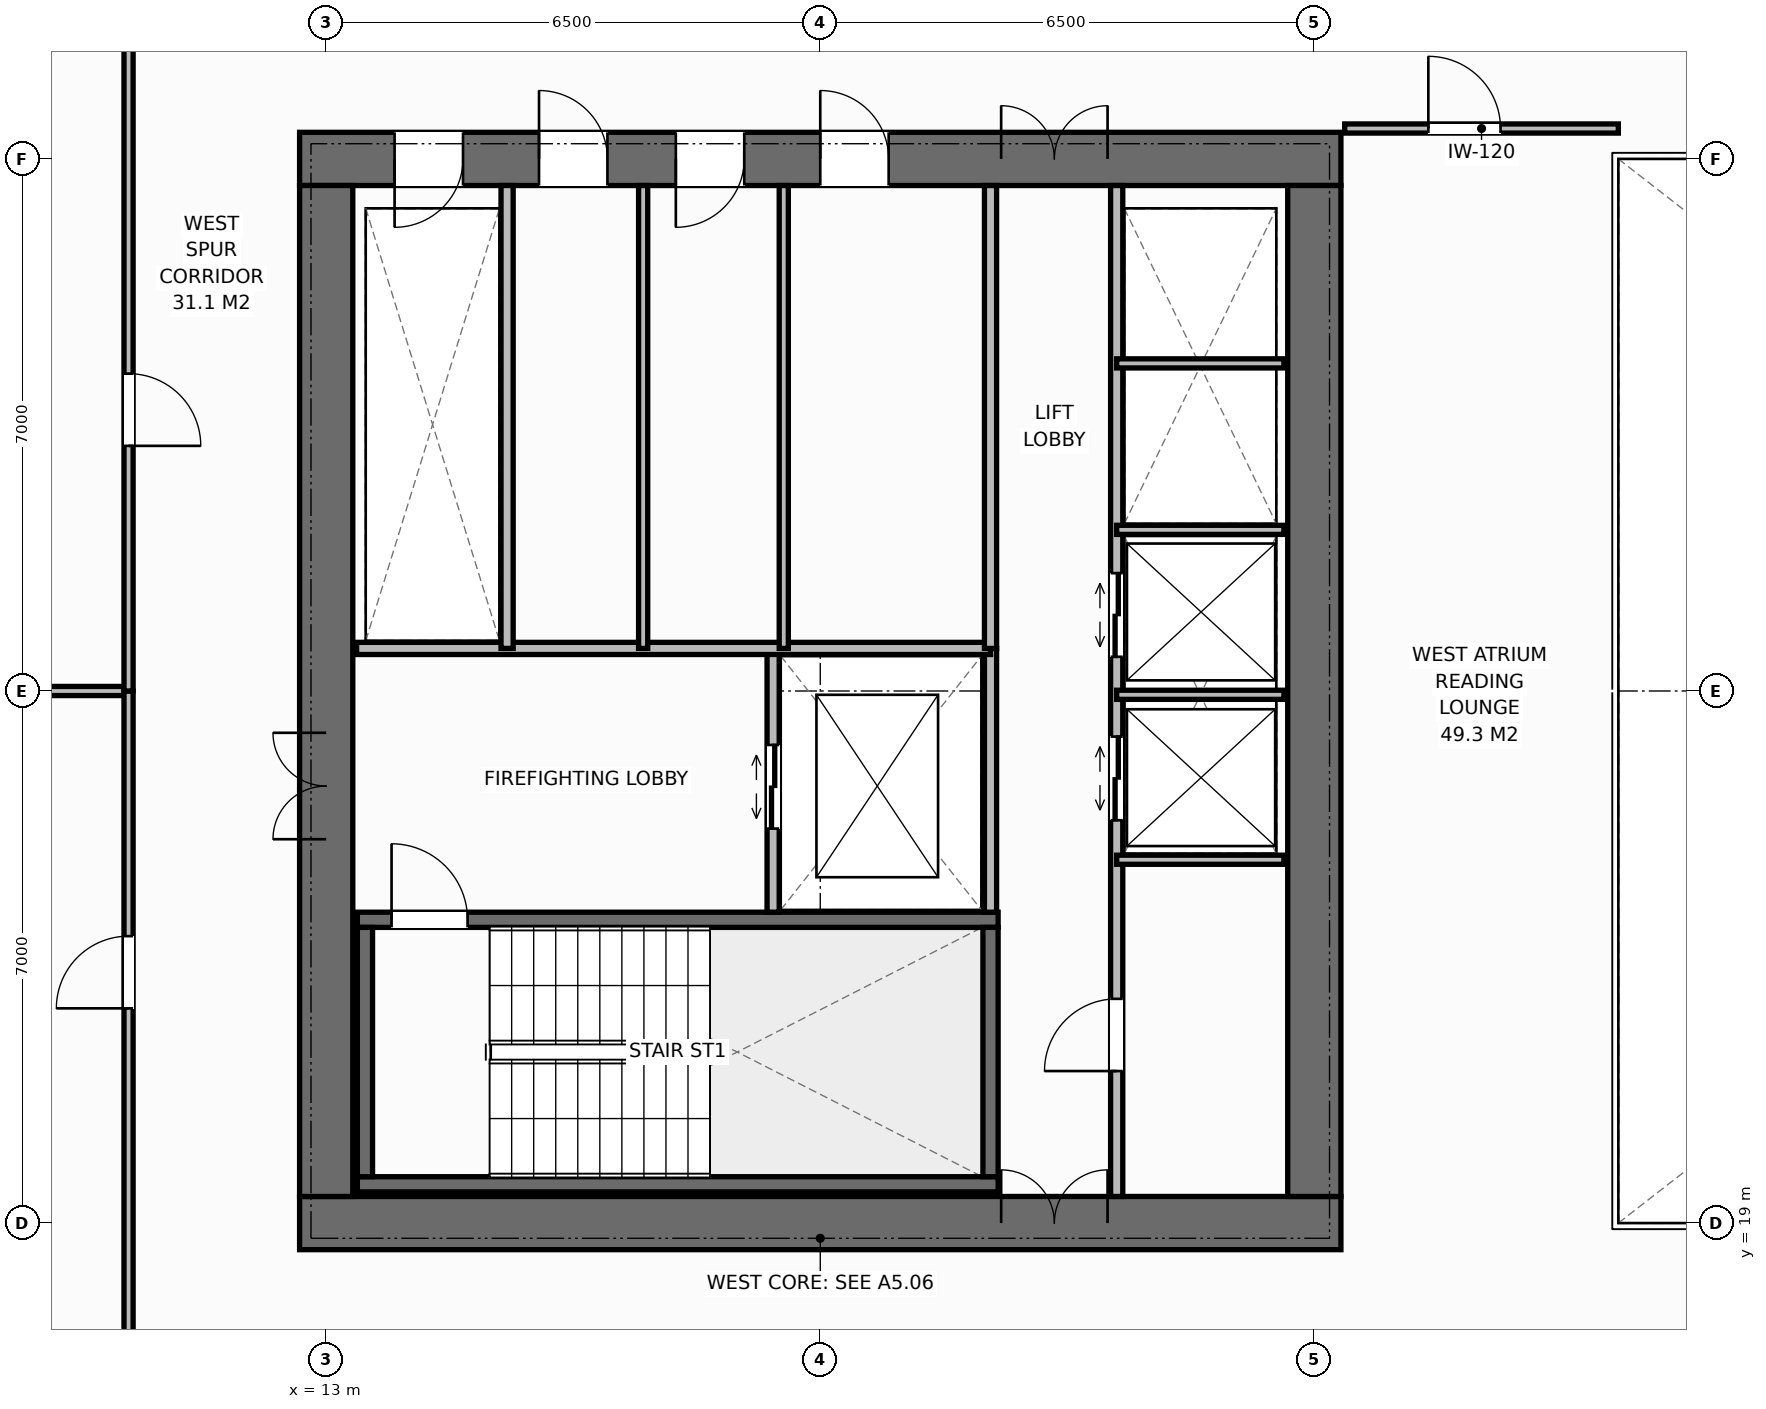
"""IFC4 building model, lengths in metres.
Left out: names, types, materials, properties, quantities, classifications, styles, units other than length and angle.
Written with IfcOpenShell. Run it as: python <this file> out.ifc"""

import sys

from ifc_helpers import new_model, si_unit, direction, frame, frame_2d, origin, place, context, subcontext, project, spatial, rectangle, extrude, element, fill, save


model = new_model("IFC4")
c1 = context("Model", 3, precision=1e-05, world=origin(), true_north=direction((0.0, 1.0)))
c2 = subcontext(c1, "Body", "Model", "MODEL_VIEW")
j1 = project(units=[si_unit("LENGTHUNIT", "METRE"), si_unit("PLANEANGLEUNIT", "RADIAN")], contexts=[c1])
p1 = place(None, origin())
s1 = spatial("IfcSite", under=j1, at=p1, CompositionType="ELEMENT")
p2 = place(p1, origin())
s2 = spatial("IfcBuilding", under=s1, at=p2, CompositionType="ELEMENT")
p3 = place(p2, frame((0.0, 0.0, 112.6)))
s3 = spatial("IfcBuildingStorey", under=s2, at=p3, CompositionType="ELEMENT", Elevation=112.6)
p4 = place(p3, frame((12.65, 19.0, 0.0), z_axis=(0.0, 0.0, 1.0), x_axis=(1.0, 0.0, 0.0)))
e1 = element("IfcWall", 1, at=p4, inside=s3, PredefinedType="SHEAR", context=c2, shape_type="SweptSolid", body=[
    extrude(rectangle(XDim=13.7, YDim=0.7, at=frame_2d((6.85, 0.0))), origin(), (0.0, 0.0, 1.0), 3.8),
])
p5 = place(p4, frame((9.23, 0.0, 0.0)))
e2 = element("IfcOpeningElement", 2, at=p5, cuts=e1, PredefinedType="OPENING", context=c2, shape_type="SweptSolid", body=[
    extrude(rectangle(XDim=1.4, YDim=2.2, at=frame_2d((0.7, 1.1))), frame((0.0, 0.36, 0.0), z_axis=(0.0, -1.0, 0.0), x_axis=(1.0, 0.0, 0.0)), (0.0, 0.0, 1.0), 0.72),
])
p6 = place(p3, frame((12.65, 33.0, 0.0), z_axis=(0.0, 0.0, 1.0), x_axis=(1.0, 0.0, 0.0)))
e3 = element("IfcWall", 3, at=p6, inside=s3, PredefinedType="SHEAR", context=c2, shape_type="SweptSolid", body=[
    extrude(rectangle(XDim=13.7, YDim=0.7, at=frame_2d((6.85, 0.0))), origin(), (0.0, 0.0, 1.0), 3.8),
])
p7 = place(p6, frame((1.25, 0.0, 0.0)))
e4 = element("IfcOpeningElement", 4, at=p7, cuts=e3, PredefinedType="OPENING", context=c2, shape_type="SweptSolid", body=[
    extrude(rectangle(XDim=0.9, YDim=2.15, at=frame_2d((0.45, 1.075))), frame((0.0, 0.36, 0.0), z_axis=(0.0, -1.0, 0.0), x_axis=(1.0, 0.0, 0.0)), (0.0, 0.0, 1.0), 0.72),
])
p8 = place(p6, frame((3.15, 0.0, 0.0)))
e5 = element("IfcOpeningElement", 5, at=p8, cuts=e3, PredefinedType="OPENING", context=c2, shape_type="SweptSolid", body=[
    extrude(rectangle(XDim=0.9, YDim=2.15, at=frame_2d((0.45, 1.075))), frame((0.0, 0.36, 0.0), z_axis=(0.0, -1.0, 0.0), x_axis=(1.0, 0.0, 0.0)), (0.0, 0.0, 1.0), 0.72),
])
p9 = place(p6, frame((4.95, 0.0, 0.0)))
e6 = element("IfcOpeningElement", 6, at=p9, cuts=e3, PredefinedType="OPENING", context=c2, shape_type="SweptSolid", body=[
    extrude(rectangle(XDim=0.9, YDim=2.15, at=frame_2d((0.45, 1.075))), frame((0.0, 0.36, 0.0), z_axis=(0.0, -1.0, 0.0), x_axis=(1.0, 0.0, 0.0)), (0.0, 0.0, 1.0), 0.72),
])
p10 = place(p6, frame((6.85, 0.0, 0.0)))
e7 = element("IfcOpeningElement", 7, at=p10, cuts=e3, PredefinedType="OPENING", context=c2, shape_type="SweptSolid", body=[
    extrude(rectangle(XDim=0.9, YDim=2.15, at=frame_2d((0.45, 1.075))), frame((0.0, 0.36, 0.0), z_axis=(0.0, -1.0, 0.0), x_axis=(1.0, 0.0, 0.0)), (0.0, 0.0, 1.0), 0.72),
])
p11 = place(p6, frame((9.23, 0.0, 0.0)))
e8 = element("IfcOpeningElement", 8, at=p11, cuts=e3, PredefinedType="OPENING", context=c2, shape_type="SweptSolid", body=[
    extrude(rectangle(XDim=1.4, YDim=2.2, at=frame_2d((0.7, 1.1))), frame((0.0, 0.36, 0.0), z_axis=(0.0, -1.0, 0.0), x_axis=(1.0, 0.0, 0.0)), (0.0, 0.0, 1.0), 0.72),
])
p12 = place(p3, frame((13.0, 19.35, 0.0), z_axis=(0.0, 0.0, 1.0), x_axis=(0.0, 1.0, 0.0)))
e9 = element("IfcWall", 9, at=p12, inside=s3, PredefinedType="SHEAR", context=c2, shape_type="SweptSolid", body=[
    extrude(rectangle(XDim=13.3, YDim=0.7, at=frame_2d((6.65, 0.0))), origin(), (0.0, 0.0, 1.0), 3.8),
])
p13 = place(p12, frame((4.7, 0.0, 0.0)))
e10 = element("IfcOpeningElement", 10, at=p13, cuts=e9, PredefinedType="OPENING", context=c2, shape_type="SweptSolid", body=[
    extrude(rectangle(XDim=1.4, YDim=2.2, at=frame_2d((0.7, 1.1))), frame((0.0, 0.36, 0.0), z_axis=(0.0, -1.0, 0.0), x_axis=(1.0, 0.0, 0.0)), (0.0, 0.0, 1.0), 0.72),
])
p14 = place(p3, frame((26.0, 19.35, 0.0), z_axis=(0.0, 0.0, 1.0), x_axis=(0.0, 1.0, 0.0)))
e11 = element("IfcWall", 11, at=p14, inside=s3, PredefinedType="SHEAR", context=c2, shape_type="SweptSolid", body=[
    extrude(rectangle(XDim=13.3, YDim=0.7, at=frame_2d((6.65, 0.0))), origin(), (0.0, 0.0, 1.0), 3.8),
])
p15 = place(p3, frame((13.41, 19.51, 0.0), z_axis=(0.0, 0.0, 1.0), x_axis=(1.0, 0.0, 0.0)))
e12 = element("IfcWall", 12, at=p15, inside=s3, PredefinedType="SHEAR", context=c2, shape_type="SweptSolid", body=[
    extrude(rectangle(XDim=8.43, YDim=0.2, at=frame_2d((4.215, 0.0))), origin(), (0.0, 0.0, 1.0), 3.8),
])
p16 = place(p3, frame((13.41, 22.99, 0.0), z_axis=(0.0, 0.0, 1.0), x_axis=(1.0, 0.0, 0.0)))
e13 = element("IfcWall", 13, at=p16, inside=s3, PredefinedType="SHEAR", context=c2, shape_type="SweptSolid", body=[
    extrude(rectangle(XDim=8.43, YDim=0.2, at=frame_2d((4.215, 0.0))), origin(), (0.0, 0.0, 1.0), 3.8),
])
p17 = place(p16, frame((0.45, 0.0, 0.0)))
e14 = element("IfcOpeningElement", 14, at=p17, cuts=e13, PredefinedType="OPENING", context=c2, shape_type="SweptSolid", body=[
    extrude(rectangle(XDim=1.0, YDim=2.15, at=frame_2d((0.5, 1.075))), frame((0.0, 0.11, 0.0), z_axis=(0.0, -1.0, 0.0), x_axis=(1.0, 0.0, 0.0)), (0.0, 0.0, 1.0), 0.22),
])
for number, where, z_axis, x_axis in (
    (15, (13.51, 19.61, 0.0), (0.0, 0.0, 1.0), (0.0, 1.0, 0.0)),
    (16, (21.74, 19.61, 0.0), (0.0, 0.0, 1.0), (0.0, 1.0, 0.0)),
):
    element("IfcWall", number, at=place(p3, frame(where, z_axis=z_axis, x_axis=x_axis)), inside=s3, PredefinedType="SHEAR", context=c2, shape_type="SweptSolid", body=[
        extrude(rectangle(XDim=3.28, YDim=0.2, at=frame_2d((1.64, 0.0))), origin(), (0.0, 0.0, 1.0), 3.8),
    ])
p18 = place(p3, frame((21.74, 23.09, 0.0), z_axis=(0.0, 0.0, 1.0), x_axis=(0.0, 1.0, 0.0)))
e17 = element("IfcWall", 17, at=p18, inside=s3, PredefinedType="STANDARD", context=c2, shape_type="SweptSolid", body=[
    extrude(rectangle(XDim=3.47, YDim=0.16, at=frame_2d((1.735, 0.0))), origin(), (0.0, 0.0, 1.0), 3.565),
])
p19 = place(p3, frame((18.88, 23.09, 0.0), z_axis=(0.0, 0.0, 1.0), x_axis=(0.0, 1.0, 0.0)))
e18 = element("IfcWall", 18, at=p19, inside=s3, PredefinedType="STANDARD", context=c2, shape_type="SweptSolid", body=[
    extrude(rectangle(XDim=3.47, YDim=0.16, at=frame_2d((1.735, 0.0))), origin(), (0.0, 0.0, 1.0), 3.565),
])
p20 = place(p19, frame((1.1, 0.0, 0.0)))
e19 = element("IfcOpeningElement", 19, at=p20, cuts=e18, PredefinedType="OPENING", context=c2, shape_type="SweptSolid", body=[
    extrude(rectangle(XDim=1.1, YDim=2.2, at=frame_2d((0.55, 1.1))), frame((0.0, 0.09, 0.0), z_axis=(0.0, -1.0, 0.0), x_axis=(1.0, 0.0, 0.0)), (0.0, 0.0, 1.0), 0.18),
])
p21 = place(p3, frame((13.4, 26.56, 0.0), z_axis=(0.0, 0.0, 1.0), x_axis=(1.0, 0.0, 0.0)))
e20 = element("IfcWall", 20, at=p21, inside=s3, PredefinedType="STANDARD", context=c2, shape_type="SweptSolid", body=[
    extrude(rectangle(XDim=8.34, YDim=0.16, at=frame_2d((4.17, 0.0))), origin(), (0.0, 0.0, 1.0), 3.565),
])
p22 = place(p3, frame((15.38, 26.56, 0.0), z_axis=(0.0, 0.0, 1.0), x_axis=(0.0, 1.0, 0.0)))
e21 = element("IfcWall", 21, at=p22, inside=s3, PredefinedType="STANDARD", context=c2, shape_type="SweptSolid", body=[
    extrude(rectangle(XDim=6.09, YDim=0.16, at=frame_2d((3.045, 0.0))), origin(), (0.0, 0.0, 1.0), 3.565),
])
for number, where, z_axis, x_axis in (
    (22, (17.17, 26.56, 0.0), (0.0, 0.0, 1.0), (0.0, 1.0, 0.0)),
    (23, (19.02, 26.56, 0.0), (0.0, 0.0, 1.0), (0.0, 1.0, 0.0)),
):
    element("IfcWall", number, at=place(p3, frame(where, z_axis=z_axis, x_axis=x_axis)), inside=s3, PredefinedType="PARTITIONING", context=c2, shape_type="SweptSolid", body=[
        extrude(rectangle(XDim=6.09, YDim=0.12, at=frame_2d((3.045, 0.0))), origin(), (0.0, 0.0, 1.0), 3.565),
    ])
p23 = place(p3, frame((21.74, 26.56, 0.0), z_axis=(0.0, 0.0, 1.0), x_axis=(0.0, 1.0, 0.0)))
e24 = element("IfcWall", 24, at=p23, inside=s3, PredefinedType="STANDARD", context=c2, shape_type="SweptSolid", body=[
    extrude(rectangle(XDim=6.09, YDim=0.16, at=frame_2d((3.045, 0.0))), origin(), (0.0, 0.0, 1.0), 3.565),
])
p24 = place(p3, frame((23.4, 19.35, 0.0), z_axis=(0.0, 0.0, 1.0), x_axis=(0.0, 1.0, 0.0)))
e25 = element("IfcWall", 25, at=p24, inside=s3, PredefinedType="STANDARD", context=c2, shape_type="SweptSolid", body=[
    extrude(rectangle(XDim=13.3, YDim=0.16, at=frame_2d((6.65, 0.0))), origin(), (0.0, 0.0, 1.0), 3.565),
])
p25 = place(p24, frame((1.65, 0.0, 0.0)))
e26 = element("IfcOpeningElement", 26, at=p25, cuts=e25, PredefinedType="OPENING", context=c2, shape_type="SweptSolid", body=[
    extrude(rectangle(XDim=0.95, YDim=2.15, at=frame_2d((0.475, 1.075))), frame((0.0, 0.09, 0.0), z_axis=(0.0, -1.0, 0.0), x_axis=(1.0, 0.0, 0.0)), (0.0, 0.0, 1.0), 0.18),
])
p26 = place(p24, frame((4.95, 0.0, 0.0)))
e27 = element("IfcOpeningElement", 27, at=p26, cuts=e25, PredefinedType="OPENING", context=c2, shape_type="SweptSolid", body=[
    extrude(rectangle(XDim=1.1, YDim=2.2, at=frame_2d((0.55, 1.1))), frame((0.0, 0.09, 0.0), z_axis=(0.0, -1.0, 0.0), x_axis=(1.0, 0.0, 0.0)), (0.0, 0.0, 1.0), 0.18),
])
p27 = place(p24, frame((7.1, 0.0, 0.0)))
e28 = element("IfcOpeningElement", 28, at=p27, cuts=e25, PredefinedType="OPENING", context=c2, shape_type="SweptSolid", body=[
    extrude(rectangle(XDim=1.1, YDim=2.2, at=frame_2d((0.55, 1.1))), frame((0.0, 0.09, 0.0), z_axis=(0.0, -1.0, 0.0), x_axis=(1.0, 0.0, 0.0)), (0.0, 0.0, 1.0), 0.18),
])
for number, where, z_axis, x_axis in (
    (29, (23.4, 23.78, 0.0), (0.0, 0.0, 1.0), (1.0, 0.0, 0.0)),
    (30, (23.4, 25.95, 0.0), (0.0, 0.0, 1.0), (1.0, 0.0, 0.0)),
    (31, (23.4, 28.12, 0.0), (0.0, 0.0, 1.0), (1.0, 0.0, 0.0)),
    (32, (23.4, 30.31, 0.0), (0.0, 0.0, 1.0), (1.0, 0.0, 0.0)),
):
    element("IfcWall", number, at=place(p3, frame(where, z_axis=z_axis, x_axis=x_axis)), inside=s3, PredefinedType="PARTITIONING", context=c2, shape_type="SweptSolid", body=[
        extrude(rectangle(XDim=2.2, YDim=0.12, at=frame_2d((1.1, 0.0))), origin(), (0.0, 0.0, 1.0), 3.565),
    ])
p28 = place(p3, frame((26.4, 33.4, 0.0), z_axis=(0.0, 0.0, 1.0), x_axis=(1.0, 0.0, 0.0)))
e33 = element("IfcWall", 33, at=p28, inside=s3, PredefinedType="PARTITIONING", context=c2, shape_type="SweptSolid", body=[
    extrude(rectangle(XDim=3.6, YDim=0.12, at=frame_2d((1.8, 0.0))), origin(), (0.0, 0.0, 1.0), 3.565),
])
p29 = place(p28, frame((1.1, 0.0, 0.0)))
e34 = element("IfcOpeningElement", 34, at=p29, cuts=e33, PredefinedType="OPENING", context=c2, shape_type="SweptSolid", body=[
    extrude(rectangle(XDim=0.95, YDim=2.15, at=frame_2d((0.475, 1.075))), frame((0.0, 0.07, 0.0), z_axis=(0.0, -1.0, 0.0), x_axis=(1.0, 0.0, 0.0)), (0.0, 0.0, 1.0), 0.14),
])
p30 = place(p3, frame((1.82, 26.0, 0.0), z_axis=(0.0, 0.0, 1.0), x_axis=(1.0, 0.0, 0.0)))
e35 = element("IfcWall", 35, at=p30, inside=s3, PredefinedType="PARTITIONING", context=c2, shape_type="SweptSolid", body=[
    extrude(rectangle(XDim=8.58, YDim=0.12, at=frame_2d((4.29, 0.0))), origin(), (0.0, 0.0, 1.0), 3.565),
])
p31 = place(p3, frame((10.4, 16.5, 0.0), z_axis=(0.0, 0.0, 1.0), x_axis=(0.0, 1.0, 0.0)))
e36 = element("IfcWall", 36, at=p31, inside=s3, PredefinedType="PARTITIONING", context=c2, shape_type="SweptSolid", body=[
    extrude(rectangle(XDim=9.5, YDim=0.12, at=frame_2d((4.75, 0.0))), origin(), (0.0, 0.0, 1.0), 3.565),
])
p32 = place(p31, frame((5.325, 0.0, 0.0)))
e37 = element("IfcOpeningElement", 37, at=p32, cuts=e36, PredefinedType="OPENING", context=c2, shape_type="SweptSolid", body=[
    extrude(rectangle(XDim=0.95, YDim=2.15, at=frame_2d((0.475, 1.075))), frame((0.0, 0.07, 0.0), z_axis=(0.0, -1.0, 0.0), x_axis=(1.0, 0.0, 0.0)), (0.0, 0.0, 1.0), 0.14),
])
p33 = place(p3, frame((10.4, 26.0, 0.0), z_axis=(0.0, 0.0, 1.0), x_axis=(0.0, 1.0, 0.0)))
e38 = element("IfcWall", 38, at=p33, inside=s3, PredefinedType="PARTITIONING", context=c2, shape_type="SweptSolid", body=[
    extrude(rectangle(XDim=9.5, YDim=0.12, at=frame_2d((4.75, 0.0))), origin(), (0.0, 0.0, 1.0), 3.565),
])
p34 = place(p33, frame((3.225, 0.0, 0.0)))
e39 = element("IfcOpeningElement", 39, at=p34, cuts=e38, PredefinedType="OPENING", context=c2, shape_type="SweptSolid", body=[
    extrude(rectangle(XDim=0.95, YDim=2.15, at=frame_2d((0.475, 1.075))), frame((0.0, 0.07, 0.0), z_axis=(0.0, -1.0, 0.0), x_axis=(1.0, 0.0, 0.0)), (0.0, 0.0, 1.0), 0.14),
])
p35 = place(p17, origin())
e40 = element("IfcDoor", 40, at=p35, inside=s3, OperationType="SINGLE_SWING_LEFT", PredefinedType="DOOR", context=c2, shape_type="SweptSolid", body=[
    extrude(rectangle(XDim=1.0, YDim=2.15, at=frame_2d((0.5, 1.075))), frame((0.0, 0.025, 0.0), z_axis=(0.0, -1.0, 0.0), x_axis=(1.0, 0.0, 0.0)), (0.0, 0.0, 1.0), 0.05),
])
fill(e14, e40)
p36 = place(p13, origin())
e41 = element("IfcDoor", 41, at=p36, inside=s3, OperationType="DOUBLE_DOOR_SINGLE_SWING", PredefinedType="DOOR", context=c2, shape_type="SweptSolid", body=[
    extrude(rectangle(XDim=1.4, YDim=2.2, at=frame_2d((0.7, 1.1))), frame((0.0, 0.025, 0.0), z_axis=(0.0, -1.0, 0.0), x_axis=(1.0, 0.0, 0.0)), (0.0, 0.0, 1.0), 0.05),
])
fill(e10, e41)
p37 = place(p20, origin())
e42 = element("IfcDoor", 42, at=p37, inside=s3, OperationType="DOUBLE_DOOR_SLIDING", PredefinedType="DOOR", context=c2, shape_type="SweptSolid", body=[
    extrude(rectangle(XDim=1.1, YDim=2.2, at=frame_2d((0.55, 1.1))), frame((0.0, 0.025, 0.0), z_axis=(0.0, -1.0, 0.0), x_axis=(1.0, 0.0, 0.0)), (0.0, 0.0, 1.0), 0.05),
])
fill(e19, e42)
p38 = place(p7, origin())
e43 = element("IfcDoor", 43, at=p38, inside=s3, OperationType="SINGLE_SWING_RIGHT", PredefinedType="DOOR", context=c2, shape_type="SweptSolid", body=[
    extrude(rectangle(XDim=0.9, YDim=2.15, at=frame_2d((0.45, 1.075))), frame((0.0, -0.075, 0.0), z_axis=(0.0, -1.0, 0.0), x_axis=(1.0, 0.0, 0.0)), (0.0, 0.0, 1.0), 0.05),
])
fill(e4, e43)
p39 = place(p8, origin())
e44 = element("IfcDoor", 44, at=p39, inside=s3, OperationType="SINGLE_SWING_LEFT", PredefinedType="DOOR", context=c2, shape_type="SweptSolid", body=[
    extrude(rectangle(XDim=0.9, YDim=2.15, at=frame_2d((0.45, 1.075))), frame((0.0, -0.075, 0.0), z_axis=(0.0, -1.0, 0.0), x_axis=(1.0, 0.0, 0.0)), (0.0, 0.0, 1.0), 0.05),
])
fill(e5, e44)
p40 = place(p9, origin())
e45 = element("IfcDoor", 45, at=p40, inside=s3, OperationType="SINGLE_SWING_RIGHT", PredefinedType="DOOR", context=c2, shape_type="SweptSolid", body=[
    extrude(rectangle(XDim=0.9, YDim=2.15, at=frame_2d((0.45, 1.075))), frame((0.0, -0.075, 0.0), z_axis=(0.0, -1.0, 0.0), x_axis=(1.0, 0.0, 0.0)), (0.0, 0.0, 1.0), 0.05),
])
fill(e6, e45)
p41 = place(p10, origin())
e46 = element("IfcDoor", 46, at=p41, inside=s3, OperationType="SINGLE_SWING_LEFT", PredefinedType="DOOR", context=c2, shape_type="SweptSolid", body=[
    extrude(rectangle(XDim=0.9, YDim=2.15, at=frame_2d((0.45, 1.075))), frame((0.0, -0.075, 0.0), z_axis=(0.0, -1.0, 0.0), x_axis=(1.0, 0.0, 0.0)), (0.0, 0.0, 1.0), 0.05),
])
fill(e7, e46)
p42 = place(p5, origin())
e47 = element("IfcDoor", 47, at=p42, inside=s3, OperationType="DOUBLE_DOOR_SINGLE_SWING", PredefinedType="DOOR", context=c2, shape_type="SweptSolid", body=[
    extrude(rectangle(XDim=1.4, YDim=2.2, at=frame_2d((0.7, 1.1))), frame((0.0, 0.125, 0.0), z_axis=(0.0, -1.0, 0.0), x_axis=(1.0, 0.0, 0.0)), (0.0, 0.0, 1.0), 0.05),
])
fill(e2, e47)
p43 = place(p11, origin())
e48 = element("IfcDoor", 48, at=p43, inside=s3, OperationType="DOUBLE_DOOR_SINGLE_SWING", PredefinedType="DOOR", context=c2, shape_type="SweptSolid", body=[
    extrude(rectangle(XDim=1.4, YDim=2.2, at=frame_2d((0.7, 1.1))), frame((0.0, -0.075, 0.0), z_axis=(0.0, -1.0, 0.0), x_axis=(1.0, 0.0, 0.0)), (0.0, 0.0, 1.0), 0.05),
])
fill(e8, e48)
p44 = place(p25, origin())
e49 = element("IfcDoor", 49, at=p44, inside=s3, OperationType="SINGLE_SWING_LEFT", PredefinedType="DOOR", context=c2, shape_type="SweptSolid", body=[
    extrude(rectangle(XDim=0.95, YDim=2.15, at=frame_2d((0.475, 1.075))), frame((0.0, 0.025, 0.0), z_axis=(0.0, -1.0, 0.0), x_axis=(1.0, 0.0, 0.0)), (0.0, 0.0, 1.0), 0.05),
])
fill(e26, e49)
p45 = place(p26, origin())
e50 = element("IfcDoor", 50, at=p45, inside=s3, OperationType="DOUBLE_DOOR_SLIDING", PredefinedType="DOOR", context=c2, shape_type="SweptSolid", body=[
    extrude(rectangle(XDim=1.1, YDim=2.2, at=frame_2d((0.55, 1.1))), frame((0.0, 0.025, 0.0), z_axis=(0.0, -1.0, 0.0), x_axis=(1.0, 0.0, 0.0)), (0.0, 0.0, 1.0), 0.05),
])
fill(e27, e50)
p46 = place(p27, origin())
e51 = element("IfcDoor", 51, at=p46, inside=s3, OperationType="DOUBLE_DOOR_SLIDING", PredefinedType="DOOR", context=c2, shape_type="SweptSolid", body=[
    extrude(rectangle(XDim=1.1, YDim=2.2, at=frame_2d((0.55, 1.1))), frame((0.0, 0.025, 0.0), z_axis=(0.0, -1.0, 0.0), x_axis=(1.0, 0.0, 0.0)), (0.0, 0.0, 1.0), 0.05),
])
fill(e28, e51)
p47 = place(p29, origin())
e52 = element("IfcDoor", 52, at=p47, inside=s3, OperationType="SINGLE_SWING_LEFT", PredefinedType="DOOR", context=c2, shape_type="SweptSolid", body=[
    extrude(rectangle(XDim=0.95, YDim=2.15, at=frame_2d((0.475, 1.075))), frame((0.0, 0.025, 0.0), z_axis=(0.0, -1.0, 0.0), x_axis=(1.0, 0.0, 0.0)), (0.0, 0.0, 1.0), 0.05),
])
fill(e34, e52)
p48 = place(p32, origin())
e53 = element("IfcDoor", 53, at=p48, inside=s3, OperationType="SINGLE_SWING_LEFT", PredefinedType="DOOR", context=c2, shape_type="SweptSolid", body=[
    extrude(rectangle(XDim=0.95, YDim=2.15, at=frame_2d((0.475, 1.075))), frame((0.0, 0.025, 0.0), z_axis=(0.0, -1.0, 0.0), x_axis=(1.0, 0.0, 0.0)), (0.0, 0.0, 1.0), 0.05),
])
fill(e37, e53)
p49 = place(p34, origin())
e54 = element("IfcDoor", 54, at=p49, inside=s3, OperationType="SINGLE_SWING_RIGHT", PredefinedType="DOOR", context=c2, shape_type="SweptSolid", body=[
    extrude(rectangle(XDim=0.95, YDim=2.15, at=frame_2d((0.475, 1.075))), frame((0.0, 0.025, 0.0), z_axis=(0.0, -1.0, 0.0), x_axis=(1.0, 0.0, 0.0)), (0.0, 0.0, 1.0), 0.05),
])
fill(e39, e54)
save(model, sys.argv[1])
